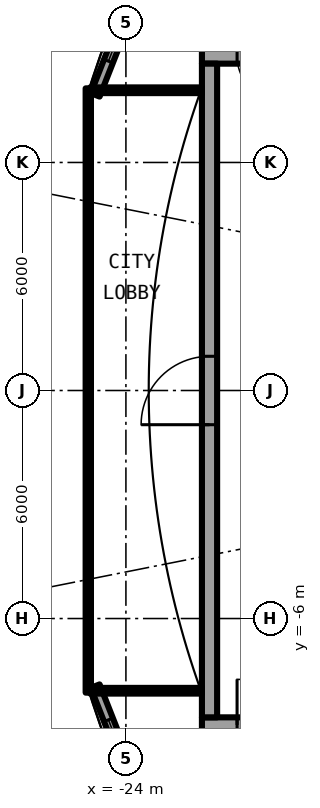
"""IFC4 building model, lengths in metres.
Left out: names, types, materials, properties, quantities, classifications, styles, units other than length and angle.
Written with IfcOpenShell. Run it as: python <this file> out.ifc"""

import sys

from ifc_helpers import new_model, si_unit, direction, frame, frame_2d, origin, place, context, subcontext, project, spatial, rectangle, extrude, element, fill, save


model = new_model("IFC4")
c1 = context("Model", 3, precision=1e-05, world=origin(), true_north=direction((0.0, 1.0)))
c2 = subcontext(c1, "Body", "Model", "MODEL_VIEW")
j1 = project(units=[si_unit("LENGTHUNIT", "METRE"), si_unit("PLANEANGLEUNIT", "RADIAN")], contexts=[c1])
p1 = place(None, origin())
s1 = spatial("IfcSite", under=j1, at=p1, CompositionType="ELEMENT")
p2 = place(p1, origin())
s2 = spatial("IfcBuilding", under=s1, at=p2, CompositionType="ELEMENT")
p3 = place(p2, frame((0.0, 0.0, 246.25)))
s3 = spatial("IfcBuildingStorey", under=s2, at=p3, CompositionType="ELEMENT", Elevation=246.25)
p4 = place(p3, frame((-24.809, -7.779, 0.0), z_axis=(0.0, 0.0, 1.0), x_axis=(0.366351636034, -0.930476479432, 0.0)))
e1 = element("IfcWall", 1, at=p4, inside=s3, PredefinedType="SOLIDWALL", context=c2, shape_type="SweptSolid", body=[
    extrude(rectangle(XDim=3.705, YDim=0.25, at=frame_2d((1.852, 0.0))), origin(), (0.0, 0.0, 1.0), 2.7),
])
p5 = place(p4, frame((0.952, 0.0, 0.3)))
e2 = element("IfcOpeningElement", 2, at=p5, cuts=e1, PredefinedType="OPENING", context=c2, shape_type="SweptSolid", body=[
    extrude(rectangle(XDim=1.8, YDim=2.1, at=frame_2d((0.9, 1.05))), frame((0.0, 0.135, 0.0), z_axis=(0.0, -1.0, 0.0), x_axis=(1.0, 0.0, 0.0)), (0.0, 0.0, 1.0), 0.27),
])
p6 = place(p3, frame((-23.452, 11.226, 0.0), z_axis=(0.0, 0.0, 1.0), x_axis=(-0.366351636034, -0.930476479432, 0.0)))
e3 = element("IfcWall", 3, at=p6, inside=s3, PredefinedType="SOLIDWALL", context=c2, shape_type="SweptSolid", body=[
    extrude(rectangle(XDim=3.705, YDim=0.25, at=frame_2d((1.852, 0.0))), origin(), (0.0, 0.0, 1.0), 2.7),
])
p7 = place(p6, frame((0.952, 0.0, 0.3)))
e4 = element("IfcOpeningElement", 4, at=p7, cuts=e3, PredefinedType="OPENING", context=c2, shape_type="SweptSolid", body=[
    extrude(rectangle(XDim=1.8, YDim=2.1, at=frame_2d((0.9, 1.05))), frame((0.0, 0.135, 0.0), z_axis=(0.0, -1.0, 0.0), x_axis=(1.0, 0.0, 0.0)), (0.0, 0.0, 1.0), 0.27),
])
p8 = place(p3, frame((-22.0, -8.8, 0.0), z_axis=(0.0, 0.0, 1.0), x_axis=(1.0, 0.0, 0.0)))
e5 = element("IfcWall", 5, at=p8, inside=s3, PredefinedType="SHEAR", context=c2, shape_type="SweptSolid", body=[
    extrude(rectangle(XDim=13.4, YDim=0.4, at=frame_2d((6.7, 0.0))), origin(), (0.0, 0.0, 1.0), 3.05),
])
p9 = place(p8, frame((0.925, 0.0, 0.0)))
e6 = element("IfcOpeningElement", 6, at=p9, cuts=e5, PredefinedType="OPENING", context=c2, shape_type="SweptSolid", body=[
    extrude(rectangle(XDim=1.2, YDim=2.3, at=frame_2d((0.6, 1.15))), frame((0.0, 0.21, 0.0), z_axis=(0.0, -1.0, 0.0), x_axis=(1.0, 0.0, 0.0)), (0.0, 0.0, 1.0), 0.42),
])
p10 = place(p3, frame((-8.6, 8.8, 0.0), z_axis=(0.0, 0.0, 1.0), x_axis=(-1.0, 0.0, 0.0)))
e7 = element("IfcWall", 7, at=p10, inside=s3, PredefinedType="SHEAR", context=c2, shape_type="SweptSolid", body=[
    extrude(rectangle(XDim=13.4, YDim=0.4, at=frame_2d((6.7, 0.0))), origin(), (0.0, 0.0, 1.0), 3.05),
])
p11 = place(p10, frame((11.275, 0.0, 0.0)))
e8 = element("IfcOpeningElement", 8, at=p11, cuts=e7, PredefinedType="OPENING", context=c2, shape_type="SweptSolid", body=[
    extrude(rectangle(XDim=1.2, YDim=2.3, at=frame_2d((0.6, 1.15))), frame((0.0, 0.21, 0.0), z_axis=(0.0, -1.0, 0.0), x_axis=(1.0, 0.0, 0.0)), (0.0, 0.0, 1.0), 0.42),
])
p12 = place(p3, frame((-21.8, -8.6, 0.0), z_axis=(0.0, 0.0, 1.0), x_axis=(0.0, 1.0, 0.0)))
e9 = element("IfcWall", 9, at=p12, inside=s3, PredefinedType="SHEAR", context=c2, shape_type="SweptSolid", body=[
    extrude(rectangle(XDim=17.2, YDim=0.4, at=frame_2d((8.6, 0.0))), origin(), (0.0, 0.0, 1.0), 3.05),
])
p13 = place(p12, frame((7.7, 0.0, 0.0)))
e10 = element("IfcOpeningElement", 10, at=p13, cuts=e9, PredefinedType="OPENING", context=c2, shape_type="SweptSolid", body=[
    extrude(rectangle(XDim=1.8, YDim=2.3, at=frame_2d((0.9, 1.15))), frame((0.0, 0.21, 0.0), z_axis=(0.0, -1.0, 0.0), x_axis=(1.0, 0.0, 0.0)), (0.0, 0.0, 1.0), 0.42),
])
for number, where, z_axis, x_axis in (
    (11, (-22.0, 7.9, 0.0), (0.0, 0.0, 1.0), (-1.0, 0.0, 0.0)),
    (12, (-22.0, -7.9, 0.0), (0.0, 0.0, 1.0), (-1.0, 0.0, 0.0)),
):
    element("IfcWall", number, at=place(p3, frame(where, z_axis=z_axis, x_axis=x_axis)), inside=s3, PredefinedType="PARTITIONING", context=c2, shape_type="SweptSolid", body=[
        extrude(rectangle(XDim=2.94, YDim=0.15, at=frame_2d((1.47, 0.0))), origin(), (0.0, 0.0, 1.0), 2.7),
    ])
p14 = place(p3, frame((-25.0, 7.95, 0.0), z_axis=(0.0, 0.0, 1.0), x_axis=(0.0, -1.0, 0.0)))
e13 = element("IfcWall", 13, at=p14, inside=s3, PredefinedType="PARTITIONING", context=c2, shape_type="SweptSolid", body=[
    extrude(rectangle(XDim=15.9, YDim=0.12, at=frame_2d((7.95, 0.0))), origin(), (0.0, 0.0, 1.0), 2.7),
])
p15 = place(p14, frame((0.95, 0.0, 0.1)))
e14 = element("IfcOpeningElement", 14, at=p15, cuts=e13, PredefinedType="OPENING", context=c2, shape_type="SweptSolid", body=[
    extrude(rectangle(XDim=14.0, YDim=2.35, at=frame_2d((7.0, 1.175))), frame((0.0, 0.07, 0.0), z_axis=(0.0, -1.0, 0.0), x_axis=(1.0, 0.0, 0.0)), (0.0, 0.0, 1.0), 0.14),
])
p16 = place(p5, origin())
e15 = element("IfcWindow", 15, at=p16, inside=s3, PartitioningType="SINGLE_PANEL", PredefinedType="WINDOW", context=c2, shape_type="SweptSolid", body=[
    extrude(rectangle(XDim=1.8, YDim=2.1, at=frame_2d((0.9, 1.05))), frame((0.0, 0.03, 0.0), z_axis=(0.0, -1.0, 0.0), x_axis=(1.0, 0.0, 0.0)), (0.0, 0.0, 1.0), 0.06),
])
fill(e2, e15)
p17 = place(p7, origin())
e16 = element("IfcWindow", 16, at=p17, inside=s3, PartitioningType="SINGLE_PANEL", PredefinedType="WINDOW", context=c2, shape_type="SweptSolid", body=[
    extrude(rectangle(XDim=1.8, YDim=2.1, at=frame_2d((0.9, 1.05))), frame((0.0, 0.03, 0.0), z_axis=(0.0, -1.0, 0.0), x_axis=(1.0, 0.0, 0.0)), (0.0, 0.0, 1.0), 0.06),
])
fill(e4, e16)
p18 = place(p9, origin())
e17 = element("IfcDoor", 17, at=p18, inside=s3, OperationType="SINGLE_SWING_RIGHT", PredefinedType="DOOR", context=c2, shape_type="SweptSolid", body=[
    extrude(rectangle(XDim=1.2, YDim=2.3, at=frame_2d((0.6, 1.15))), frame((0.0, 0.025, 0.0), z_axis=(0.0, -1.0, 0.0), x_axis=(1.0, 0.0, 0.0)), (0.0, 0.0, 1.0), 0.05),
])
fill(e6, e17)
p19 = place(p11, origin())
e18 = element("IfcDoor", 18, at=p19, inside=s3, OperationType="SINGLE_SWING_LEFT", PredefinedType="DOOR", context=c2, shape_type="SweptSolid", body=[
    extrude(rectangle(XDim=1.2, YDim=2.3, at=frame_2d((0.6, 1.15))), frame((0.0, 0.025, 0.0), z_axis=(0.0, -1.0, 0.0), x_axis=(1.0, 0.0, 0.0)), (0.0, 0.0, 1.0), 0.05),
])
fill(e8, e18)
p20 = place(p13, origin())
e19 = element("IfcDoor", 19, at=p20, inside=s3, OperationType="SINGLE_SWING_LEFT", PredefinedType="DOOR", context=c2, shape_type="SweptSolid", body=[
    extrude(rectangle(XDim=1.8, YDim=2.3, at=frame_2d((0.9, 1.15))), frame((0.0, 0.025, 0.0), z_axis=(0.0, -1.0, 0.0), x_axis=(1.0, 0.0, 0.0)), (0.0, 0.0, 1.0), 0.05),
])
fill(e10, e19)
p21 = place(p15, origin())
e20 = element("IfcWindow", 20, at=p21, inside=s3, PartitioningType="SINGLE_PANEL", PredefinedType="WINDOW", context=c2, shape_type="SweptSolid", body=[
    extrude(rectangle(XDim=14.0, YDim=2.35, at=frame_2d((7.0, 1.175))), frame((0.0, 0.03, 0.0), z_axis=(0.0, -1.0, 0.0), x_axis=(1.0, 0.0, 0.0)), (0.0, 0.0, 1.0), 0.06),
])
fill(e14, e20)
save(model, sys.argv[1])
